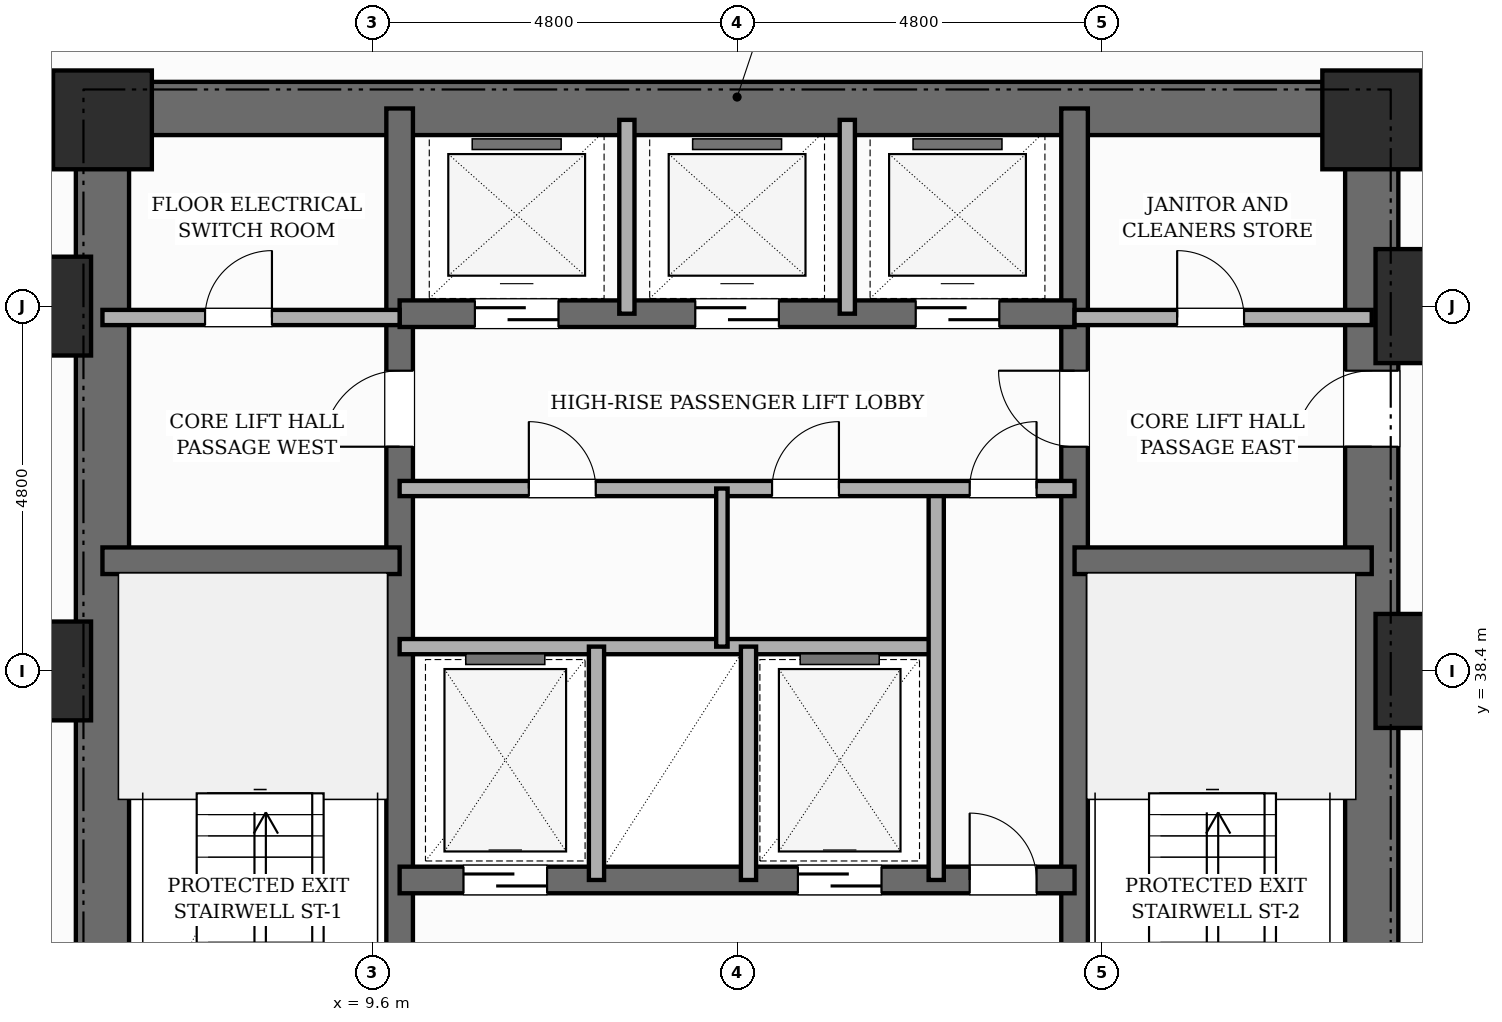
"""IFC4 building model, lengths in metres.
Left out: names, types, materials, properties, quantities, classifications, styles, units other than length and angle.
Written with IfcOpenShell. Run it as: python <this file> out.ifc"""

import sys

from ifc_helpers import new_model, si_unit, direction, frame, frame_2d, origin, origin_2d, place, context, subcontext, project, spatial, rectangle, extrude, element, fill, save


model = new_model("IFC4")
c1 = context("Model", 3, precision=1e-05, world=origin(), true_north=direction((0.0, 1.0)))
c2 = subcontext(c1, "Body", "Model", "MODEL_VIEW")
j1 = project(units=[si_unit("LENGTHUNIT", "METRE"), si_unit("PLANEANGLEUNIT", "RADIAN")], contexts=[c1])
p1 = place(None, origin())
s1 = spatial("IfcSite", under=j1, at=p1, CompositionType="ELEMENT")
p2 = place(p1, origin())
s2 = spatial("IfcBuilding", under=s1, at=p2, CompositionType="ELEMENT")
p3 = place(p2, origin())
s3 = spatial("IfcBuildingStorey", under=s2, at=p3, CompositionType="ELEMENT", Elevation=0.0)
p4 = place(p3, frame((6.05, 30.55, 0.0), z_axis=(0.0, 0.0, 1.0), x_axis=(0.0, 1.0, 0.0)))
e1 = element("IfcWall", 1, at=p4, inside=s3, PredefinedType="SHEAR", context=c2, shape_type="SweptSolid", body=[
    extrude(rectangle(XDim=15.6, YDim=0.7, at=frame_2d((7.8, 0.0))), origin(), (0.0, 0.0, 1.0), 5.2),
])
p5 = place(p4, frame((1.25, 0.0, 0.0)))
e2 = element("IfcOpeningElement", 2, at=p5, cuts=e1, PredefinedType="OPENING", context=c2, shape_type="SweptSolid", body=[
    extrude(rectangle(XDim=1.0, YDim=2.15, at=frame_2d((0.5, 1.075))), frame((0.0, 0.36, 0.0), z_axis=(0.0, -1.0, 0.0), x_axis=(1.0, 0.0, 0.0)), (0.0, 0.0, 1.0), 0.72),
])
p6 = place(p3, frame((22.75, 30.55, 0.0), z_axis=(0.0, 0.0, 1.0), x_axis=(0.0, 1.0, 0.0)))
e3 = element("IfcWall", 3, at=p6, inside=s3, PredefinedType="SHEAR", context=c2, shape_type="SweptSolid", body=[
    extrude(rectangle(XDim=15.6, YDim=0.7, at=frame_2d((7.8, 0.0))), origin(), (0.0, 0.0, 1.0), 5.2),
])
p7 = place(p6, frame((10.8, 0.0, 0.0)))
e4 = element("IfcOpeningElement", 4, at=p7, cuts=e3, PredefinedType="OPENING", context=c2, shape_type="SweptSolid", body=[
    extrude(rectangle(XDim=1.0, YDim=2.15, at=frame_2d((0.5, 1.075))), frame((0.0, 0.36, 0.0), z_axis=(0.0, -1.0, 0.0), x_axis=(1.0, 0.0, 0.0)), (0.0, 0.0, 1.0), 0.72),
])
p8 = place(p3, frame((6.05, 45.8, 0.0), z_axis=(0.0, 0.0, 1.0), x_axis=(1.0, 0.0, 0.0)))
e5 = element("IfcWall", 5, at=p8, inside=s3, PredefinedType="SHEAR", context=c2, shape_type="SweptSolid", body=[
    extrude(rectangle(XDim=16.7, YDim=0.7, at=frame_2d((8.35, 0.0))), origin(), (0.0, 0.0, 1.0), 5.2),
])
p9 = place(p3, frame((9.96, 30.9, 0.0), z_axis=(0.0, 0.0, 1.0), x_axis=(0.0, 1.0, 0.0)))
e6 = element("IfcWall", 6, at=p9, inside=s3, PredefinedType="SHEAR", context=c2, shape_type="SweptSolid", body=[
    extrude(rectangle(XDim=14.9, YDim=0.35, at=frame_2d((7.45, 0.0))), origin(), (0.0, 0.0, 1.0), 5.2),
])
p10 = place(p9, frame((0.65, 0.0, 0.0)))
e7 = element("IfcOpeningElement", 7, at=p10, cuts=e6, PredefinedType="OPENING", context=c2, shape_type="SweptSolid", body=[
    extrude(rectangle(XDim=0.95, YDim=2.1, at=frame_2d((0.475, 1.05))), frame((0.0, 0.185, 0.0), z_axis=(0.0, -1.0, 0.0), x_axis=(1.0, 0.0, 0.0)), (0.0, 0.0, 1.0), 0.37),
])
p11 = place(p9, frame((10.45, 0.0, 0.0)))
e8 = element("IfcOpeningElement", 8, at=p11, cuts=e6, PredefinedType="OPENING", context=c2, shape_type="SweptSolid", body=[
    extrude(rectangle(XDim=1.0, YDim=2.15, at=frame_2d((0.5, 1.075))), frame((0.0, 0.185, 0.0), z_axis=(0.0, -1.0, 0.0), x_axis=(1.0, 0.0, 0.0)), (0.0, 0.0, 1.0), 0.37),
])
p12 = place(p3, frame((18.84, 30.9, 0.0), z_axis=(0.0, 0.0, 1.0), x_axis=(0.0, 1.0, 0.0)))
e9 = element("IfcWall", 9, at=p12, inside=s3, PredefinedType="SHEAR", context=c2, shape_type="SweptSolid", body=[
    extrude(rectangle(XDim=14.9, YDim=0.35, at=frame_2d((7.45, 0.0))), origin(), (0.0, 0.0, 1.0), 5.2),
])
p13 = place(p12, frame((0.65, 0.0, 0.0)))
e10 = element("IfcOpeningElement", 10, at=p13, cuts=e9, PredefinedType="OPENING", context=c2, shape_type="SweptSolid", body=[
    extrude(rectangle(XDim=0.95, YDim=2.1, at=frame_2d((0.475, 1.05))), frame((0.0, 0.185, 0.0), z_axis=(0.0, -1.0, 0.0), x_axis=(1.0, 0.0, 0.0)), (0.0, 0.0, 1.0), 0.37),
])
p14 = place(p12, frame((10.45, 0.0, 0.0)))
e11 = element("IfcOpeningElement", 11, at=p14, cuts=e9, PredefinedType="OPENING", context=c2, shape_type="SweptSolid", body=[
    extrude(rectangle(XDim=1.0, YDim=2.15, at=frame_2d((0.5, 1.075))), frame((0.0, 0.185, 0.0), z_axis=(0.0, -1.0, 0.0), x_axis=(1.0, 0.0, 0.0)), (0.0, 0.0, 1.0), 0.37),
])
for number, where, z_axis, x_axis in (
    (12, (6.05, 39.85, 0.0), (0.0, 0.0, 1.0), (1.0, 0.0, 0.0)),
    (13, (18.84, 39.85, 0.0), (0.0, 0.0, 1.0), (1.0, 0.0, 0.0)),
):
    element("IfcWall", number, at=place(p3, frame(where, z_axis=z_axis, x_axis=x_axis)), inside=s3, PredefinedType="SHEAR", context=c2, shape_type="SweptSolid", body=[
        extrude(rectangle(XDim=3.91, YDim=0.35, at=frame_2d((1.955, 0.0))), origin(), (0.0, 0.0, 1.0), 5.2),
    ])
p15 = place(p3, frame((9.96, 35.65, 0.0), z_axis=(0.0, 0.0, 1.0), x_axis=(1.0, 0.0, 0.0)))
e14 = element("IfcWall", 14, at=p15, inside=s3, PredefinedType="SHEAR", context=c2, shape_type="SweptSolid", body=[
    extrude(rectangle(XDim=8.88, YDim=0.35, at=frame_2d((4.44, 0.0))), origin(), (0.0, 0.0, 1.0), 5.2),
])
p16 = place(p15, frame((0.84, 0.0, 0.0)))
e15 = element("IfcOpeningElement", 15, at=p16, cuts=e14, PredefinedType="OPENING", context=c2, shape_type="SweptSolid", body=[
    extrude(rectangle(XDim=1.1, YDim=2.15, at=frame_2d((0.55, 1.075))), frame((0.0, 0.185, 0.0), z_axis=(0.0, -1.0, 0.0), x_axis=(1.0, 0.0, 0.0)), (0.0, 0.0, 1.0), 0.37),
])
p17 = place(p15, frame((5.24, 0.0, 0.0)))
e16 = element("IfcOpeningElement", 16, at=p17, cuts=e14, PredefinedType="OPENING", context=c2, shape_type="SweptSolid", body=[
    extrude(rectangle(XDim=1.1, YDim=2.15, at=frame_2d((0.55, 1.075))), frame((0.0, 0.185, 0.0), z_axis=(0.0, -1.0, 0.0), x_axis=(1.0, 0.0, 0.0)), (0.0, 0.0, 1.0), 0.37),
])
p18 = place(p15, frame((7.5, 0.0, 0.0)))
e17 = element("IfcOpeningElement", 17, at=p18, cuts=e14, PredefinedType="OPENING", context=c2, shape_type="SweptSolid", body=[
    extrude(rectangle(XDim=0.88, YDim=2.1, at=frame_2d((0.44, 1.05))), frame((0.0, 0.185, 0.0), z_axis=(0.0, -1.0, 0.0), x_axis=(1.0, 0.0, 0.0)), (0.0, 0.0, 1.0), 0.37),
])
p19 = place(p3, frame((9.96, 43.1, 0.0), z_axis=(0.0, 0.0, 1.0), x_axis=(1.0, 0.0, 0.0)))
e18 = element("IfcWall", 18, at=p19, inside=s3, PredefinedType="SHEAR", context=c2, shape_type="SweptSolid", body=[
    extrude(rectangle(XDim=8.88, YDim=0.35, at=frame_2d((4.44, 0.0))), origin(), (0.0, 0.0, 1.0), 5.2),
])
p20 = place(p19, frame((0.99, 0.0, 0.0)))
e19 = element("IfcOpeningElement", 19, at=p20, cuts=e18, PredefinedType="OPENING", context=c2, shape_type="SweptSolid", body=[
    extrude(rectangle(XDim=1.1, YDim=2.15, at=frame_2d((0.55, 1.075))), frame((0.0, 0.185, 0.0), z_axis=(0.0, -1.0, 0.0), x_axis=(1.0, 0.0, 0.0)), (0.0, 0.0, 1.0), 0.37),
])
p21 = place(p19, frame((3.89, 0.0, 0.0)))
e20 = element("IfcOpeningElement", 20, at=p21, cuts=e18, PredefinedType="OPENING", context=c2, shape_type="SweptSolid", body=[
    extrude(rectangle(XDim=1.1, YDim=2.15, at=frame_2d((0.55, 1.075))), frame((0.0, 0.185, 0.0), z_axis=(0.0, -1.0, 0.0), x_axis=(1.0, 0.0, 0.0)), (0.0, 0.0, 1.0), 0.37),
])
p22 = place(p19, frame((6.79, 0.0, 0.0)))
e21 = element("IfcOpeningElement", 21, at=p22, cuts=e18, PredefinedType="OPENING", context=c2, shape_type="SweptSolid", body=[
    extrude(rectangle(XDim=1.1, YDim=2.15, at=frame_2d((0.55, 1.075))), frame((0.0, 0.185, 0.0), z_axis=(0.0, -1.0, 0.0), x_axis=(1.0, 0.0, 0.0)), (0.0, 0.0, 1.0), 0.37),
])
for number, where, z_axis, x_axis in (
    (22, (5.25, 38.4, 0.0), (0.0, 0.0, 1.0), (1.0, 0.0, 0.0)),
    (23, (5.25, 43.2, 0.0), (0.0, 0.0, 1.0), (1.0, 0.0, 0.0)),
    (24, (6.05, 45.65, 0.0), (0.0, 0.0, 1.0), (1.0, 0.0, 0.0)),
    (25, (22.75, 45.65, 0.0), (0.0, 0.0, 1.0), (1.0, 0.0, 0.0)),
):
    element("IfcColumn", number, at=place(p3, frame(where, z_axis=z_axis, x_axis=x_axis)), inside=s3, PredefinedType="COLUMN", context=c2, shape_type="SweptSolid", body=[
        extrude(rectangle(XDim=1.3, YDim=1.3, at=origin_2d()), origin(), (0.0, 0.0, 1.0), 5.2),
    ])
for number, where, z_axis, x_axis in (
    (26, (23.55, 38.4, 0.0), (0.0, 0.0, 1.0), (1.0, 0.0, 0.0)),
    (27, (23.55, 43.2, 0.0), (0.0, 0.0, 1.0), (1.0, 0.0, 0.0)),
):
    element("IfcColumn", number, at=place(p3, frame(where, z_axis=z_axis, x_axis=x_axis)), inside=s3, PredefinedType="USERDEFINED", context=c2, shape_type="SweptSolid", body=[
        extrude(rectangle(XDim=1.5, YDim=1.5, at=origin_2d()), origin(), (0.0, 0.0, 1.0), 5.2),
    ])
p23 = place(p3, frame((9.96, 38.72, 0.0), z_axis=(0.0, 0.0, 1.0), x_axis=(1.0, 0.0, 0.0)))
e28 = element("IfcWall", 28, at=p23, inside=s3, PredefinedType="POLYGONAL", context=c2, shape_type="SweptSolid", body=[
    extrude(rectangle(XDim=7.06, YDim=0.2, at=frame_2d((3.53, 0.0))), origin(), (0.0, 0.0, 1.0), 4.89),
])
for number, where, z_axis, x_axis in (
    (29, (12.55, 35.65, 0.0), (0.0, 0.0, 1.0), (0.0, 1.0, 0.0)),
    (30, (14.55, 35.65, 0.0), (0.0, 0.0, 1.0), (0.0, 1.0, 0.0)),
):
    element("IfcWall", number, at=place(p3, frame(where, z_axis=z_axis, x_axis=x_axis)), inside=s3, PredefinedType="POLYGONAL", context=c2, shape_type="SweptSolid", body=[
        extrude(rectangle(XDim=3.07, YDim=0.2, at=frame_2d((1.535, 0.0))), origin(), (0.0, 0.0, 1.0), 4.89),
    ])
p24 = place(p3, frame((17.02, 35.65, 0.0), z_axis=(0.0, 0.0, 1.0), x_axis=(0.0, 1.0, 0.0)))
e31 = element("IfcWall", 31, at=p24, inside=s3, PredefinedType="POLYGONAL", context=c2, shape_type="SweptSolid", body=[
    extrude(rectangle(XDim=5.15, YDim=0.2, at=frame_2d((2.575, 0.0))), origin(), (0.0, 0.0, 1.0), 4.89),
])
p25 = place(p3, frame((9.96, 40.8, 0.0), z_axis=(0.0, 0.0, 1.0), x_axis=(1.0, 0.0, 0.0)))
e32 = element("IfcWall", 32, at=p25, inside=s3, PredefinedType="POLYGONAL", context=c2, shape_type="SweptSolid", body=[
    extrude(rectangle(XDim=8.88, YDim=0.2, at=frame_2d((4.44, 0.0))), origin(), (0.0, 0.0, 1.0), 4.89),
])
p26 = place(p25, frame((7.5, 0.0, 0.0)))
e33 = element("IfcOpeningElement", 33, at=p26, cuts=e32, PredefinedType="OPENING", context=c2, shape_type="SweptSolid", body=[
    extrude(rectangle(XDim=0.88, YDim=2.1, at=frame_2d((0.44, 1.05))), frame((0.0, 0.11, 0.0), z_axis=(0.0, -1.0, 0.0), x_axis=(1.0, 0.0, 0.0)), (0.0, 0.0, 1.0), 0.22),
])
p27 = place(p25, frame((1.7, 0.0, 0.0)))
e34 = element("IfcOpeningElement", 34, at=p27, cuts=e32, PredefinedType="OPENING", context=c2, shape_type="SweptSolid", body=[
    extrude(rectangle(XDim=0.88, YDim=2.1, at=frame_2d((0.44, 1.05))), frame((0.0, 0.11, 0.0), z_axis=(0.0, -1.0, 0.0), x_axis=(1.0, 0.0, 0.0)), (0.0, 0.0, 1.0), 0.22),
])
p28 = place(p25, frame((4.9, 0.0, 0.0)))
e35 = element("IfcOpeningElement", 35, at=p28, cuts=e32, PredefinedType="OPENING", context=c2, shape_type="SweptSolid", body=[
    extrude(rectangle(XDim=0.88, YDim=2.1, at=frame_2d((0.44, 1.05))), frame((0.0, 0.11, 0.0), z_axis=(0.0, -1.0, 0.0), x_axis=(1.0, 0.0, 0.0)), (0.0, 0.0, 1.0), 0.22),
])
p29 = place(p3, frame((18.84, 43.05, 0.0), z_axis=(0.0, 0.0, 1.0), x_axis=(1.0, 0.0, 0.0)))
e36 = element("IfcWall", 36, at=p29, inside=s3, PredefinedType="POLYGONAL", context=c2, shape_type="SweptSolid", body=[
    extrude(rectangle(XDim=3.91, YDim=0.2, at=frame_2d((1.955, 0.0))), origin(), (0.0, 0.0, 1.0), 3.97),
])
p30 = place(p29, frame((1.35, 0.0, 0.0)))
e37 = element("IfcOpeningElement", 37, at=p30, cuts=e36, PredefinedType="OPENING", context=c2, shape_type="SweptSolid", body=[
    extrude(rectangle(XDim=0.88, YDim=2.1, at=frame_2d((0.44, 1.05))), frame((0.0, 0.11, 0.0), z_axis=(0.0, -1.0, 0.0), x_axis=(1.0, 0.0, 0.0)), (0.0, 0.0, 1.0), 0.22),
])
p31 = place(p3, frame((6.05, 43.05, 0.0), z_axis=(0.0, 0.0, 1.0), x_axis=(1.0, 0.0, 0.0)))
e38 = element("IfcWall", 38, at=p31, inside=s3, PredefinedType="POLYGONAL", context=c2, shape_type="SweptSolid", body=[
    extrude(rectangle(XDim=3.91, YDim=0.2, at=frame_2d((1.955, 0.0))), origin(), (0.0, 0.0, 1.0), 3.97),
])
p32 = place(p31, frame((1.35, 0.0, 0.0)))
e39 = element("IfcOpeningElement", 39, at=p32, cuts=e38, PredefinedType="OPENING", context=c2, shape_type="SweptSolid", body=[
    extrude(rectangle(XDim=0.88, YDim=2.1, at=frame_2d((0.44, 1.05))), frame((0.0, 0.11, 0.0), z_axis=(0.0, -1.0, 0.0), x_axis=(1.0, 0.0, 0.0)), (0.0, 0.0, 1.0), 0.22),
])
for number, where, z_axis, x_axis in (
    (40, (12.95, 43.1, 0.0), (0.0, 0.0, 1.0), (0.0, 1.0, 0.0)),
    (41, (15.85, 43.1, 0.0), (0.0, 0.0, 1.0), (0.0, 1.0, 0.0)),
):
    element("IfcWall", number, at=place(p3, frame(where, z_axis=z_axis, x_axis=x_axis)), inside=s3, PredefinedType="POLYGONAL", context=c2, shape_type="SweptSolid", body=[
        extrude(rectangle(XDim=2.55, YDim=0.2, at=frame_2d((1.275, 0.0))), origin(), (0.0, 0.0, 1.0), 4.89),
    ])
p33 = place(p3, frame((14.2, 38.72, 0.0), z_axis=(0.0, 0.0, 1.0), x_axis=(0.0, 1.0, 0.0)))
e42 = element("IfcWall", 42, at=p33, inside=s3, PredefinedType="PARTITIONING", context=c2, shape_type="SweptSolid", body=[
    extrude(rectangle(XDim=2.08, YDim=0.15, at=frame_2d((1.04, 0.0))), origin(), (0.0, 0.0, 1.0), 4.89),
])
p34 = place(p16, origin())
e43 = element("IfcDoor", 43, at=p34, inside=s3, OperationType="SLIDING_TO_LEFT", PredefinedType="DOOR", context=c2, shape_type="SweptSolid", body=[
    extrude(rectangle(XDim=1.1, YDim=2.15, at=frame_2d((0.55, 1.075))), frame((0.0, 0.025, 0.0), z_axis=(0.0, -1.0, 0.0), x_axis=(1.0, 0.0, 0.0)), (0.0, 0.0, 1.0), 0.05),
])
fill(e15, e43)
p35 = place(p17, origin())
e44 = element("IfcDoor", 44, at=p35, inside=s3, OperationType="SLIDING_TO_RIGHT", PredefinedType="DOOR", context=c2, shape_type="SweptSolid", body=[
    extrude(rectangle(XDim=1.1, YDim=2.15, at=frame_2d((0.55, 1.075))), frame((0.0, 0.025, 0.0), z_axis=(0.0, -1.0, 0.0), x_axis=(1.0, 0.0, 0.0)), (0.0, 0.0, 1.0), 0.05),
])
fill(e16, e44)
p36 = place(p18, origin())
e45 = element("IfcDoor", 45, at=p36, inside=s3, OperationType="SINGLE_SWING_LEFT", PredefinedType="DOOR", context=c2, shape_type="SweptSolid", body=[
    extrude(rectangle(XDim=0.88, YDim=2.1, at=frame_2d((0.44, 1.05))), frame((0.0, 0.025, 0.0), z_axis=(0.0, -1.0, 0.0), x_axis=(1.0, 0.0, 0.0)), (0.0, 0.0, 1.0), 0.05),
])
fill(e17, e45)
p37 = place(p26, origin())
e46 = element("IfcDoor", 46, at=p37, inside=s3, OperationType="SINGLE_SWING_RIGHT", PredefinedType="DOOR", context=c2, shape_type="SweptSolid", body=[
    extrude(rectangle(XDim=0.88, YDim=2.1, at=frame_2d((0.44, 1.05))), frame((0.0, 0.025, 0.0), z_axis=(0.0, -1.0, 0.0), x_axis=(1.0, 0.0, 0.0)), (0.0, 0.0, 1.0), 0.05),
])
fill(e33, e46)
p38 = place(p20, origin())
e47 = element("IfcDoor", 47, at=p38, inside=s3, OperationType="SLIDING_TO_LEFT", PredefinedType="DOOR", context=c2, shape_type="SweptSolid", body=[
    extrude(rectangle(XDim=1.1, YDim=2.15, at=frame_2d((0.55, 1.075))), frame((0.0, 0.025, 0.0), z_axis=(0.0, -1.0, 0.0), x_axis=(1.0, 0.0, 0.0)), (0.0, 0.0, 1.0), 0.05),
])
fill(e19, e47)
p39 = place(p21, origin())
e48 = element("IfcDoor", 48, at=p39, inside=s3, OperationType="SLIDING_TO_RIGHT", PredefinedType="DOOR", context=c2, shape_type="SweptSolid", body=[
    extrude(rectangle(XDim=1.1, YDim=2.15, at=frame_2d((0.55, 1.075))), frame((0.0, 0.025, 0.0), z_axis=(0.0, -1.0, 0.0), x_axis=(1.0, 0.0, 0.0)), (0.0, 0.0, 1.0), 0.05),
])
fill(e20, e48)
p40 = place(p22, origin())
e49 = element("IfcDoor", 49, at=p40, inside=s3, OperationType="SLIDING_TO_LEFT", PredefinedType="DOOR", context=c2, shape_type="SweptSolid", body=[
    extrude(rectangle(XDim=1.1, YDim=2.15, at=frame_2d((0.55, 1.075))), frame((0.0, 0.025, 0.0), z_axis=(0.0, -1.0, 0.0), x_axis=(1.0, 0.0, 0.0)), (0.0, 0.0, 1.0), 0.05),
])
fill(e21, e49)
p41 = place(p11, origin())
e50 = element("IfcDoor", 50, at=p41, inside=s3, OperationType="SINGLE_SWING_LEFT", PredefinedType="DOOR", context=c2, shape_type="SweptSolid", body=[
    extrude(rectangle(XDim=1.0, YDim=2.15, at=frame_2d((0.5, 1.075))), frame((0.0, 0.025, 0.0), z_axis=(0.0, -1.0, 0.0), x_axis=(1.0, 0.0, 0.0)), (0.0, 0.0, 1.0), 0.05),
])
fill(e8, e50)
p42 = place(p14, origin())
e51 = element("IfcDoor", 51, at=p42, inside=s3, OperationType="SINGLE_SWING_RIGHT", PredefinedType="DOOR", context=c2, shape_type="SweptSolid", body=[
    extrude(rectangle(XDim=1.0, YDim=2.15, at=frame_2d((0.5, 1.075))), frame((0.0, 0.025, 0.0), z_axis=(0.0, -1.0, 0.0), x_axis=(1.0, 0.0, 0.0)), (0.0, 0.0, 1.0), 0.05),
])
fill(e11, e51)
p43 = place(p7, origin())
e52 = element("IfcDoor", 52, at=p43, inside=s3, OperationType="SINGLE_SWING_LEFT", PredefinedType="DOOR", context=c2, shape_type="SweptSolid", body=[
    extrude(rectangle(XDim=1.0, YDim=2.15, at=frame_2d((0.5, 1.075))), frame((0.0, 0.025, 0.0), z_axis=(0.0, -1.0, 0.0), x_axis=(1.0, 0.0, 0.0)), (0.0, 0.0, 1.0), 0.05),
])
fill(e4, e52)
p44 = place(p32, origin())
e53 = element("IfcDoor", 53, at=p44, inside=s3, OperationType="SINGLE_SWING_RIGHT", PredefinedType="DOOR", context=c2, shape_type="SweptSolid", body=[
    extrude(rectangle(XDim=0.88, YDim=2.1, at=frame_2d((0.44, 1.05))), frame((0.0, 0.025, 0.0), z_axis=(0.0, -1.0, 0.0), x_axis=(1.0, 0.0, 0.0)), (0.0, 0.0, 1.0), 0.05),
])
fill(e39, e53)
p45 = place(p27, origin())
e54 = element("IfcDoor", 54, at=p45, inside=s3, OperationType="SINGLE_SWING_LEFT", PredefinedType="DOOR", context=c2, shape_type="SweptSolid", body=[
    extrude(rectangle(XDim=0.88, YDim=2.1, at=frame_2d((0.44, 1.05))), frame((0.0, 0.025, 0.0), z_axis=(0.0, -1.0, 0.0), x_axis=(1.0, 0.0, 0.0)), (0.0, 0.0, 1.0), 0.05),
])
fill(e34, e54)
p46 = place(p28, origin())
e55 = element("IfcDoor", 55, at=p46, inside=s3, OperationType="SINGLE_SWING_RIGHT", PredefinedType="DOOR", context=c2, shape_type="SweptSolid", body=[
    extrude(rectangle(XDim=0.88, YDim=2.1, at=frame_2d((0.44, 1.05))), frame((0.0, 0.025, 0.0), z_axis=(0.0, -1.0, 0.0), x_axis=(1.0, 0.0, 0.0)), (0.0, 0.0, 1.0), 0.05),
])
fill(e35, e55)
p47 = place(p30, origin())
e56 = element("IfcDoor", 56, at=p47, inside=s3, OperationType="SINGLE_SWING_LEFT", PredefinedType="DOOR", context=c2, shape_type="SweptSolid", body=[
    extrude(rectangle(XDim=0.88, YDim=2.1, at=frame_2d((0.44, 1.05))), frame((0.0, 0.025, 0.0), z_axis=(0.0, -1.0, 0.0), x_axis=(1.0, 0.0, 0.0)), (0.0, 0.0, 1.0), 0.05),
])
fill(e37, e56)
save(model, sys.argv[1])
